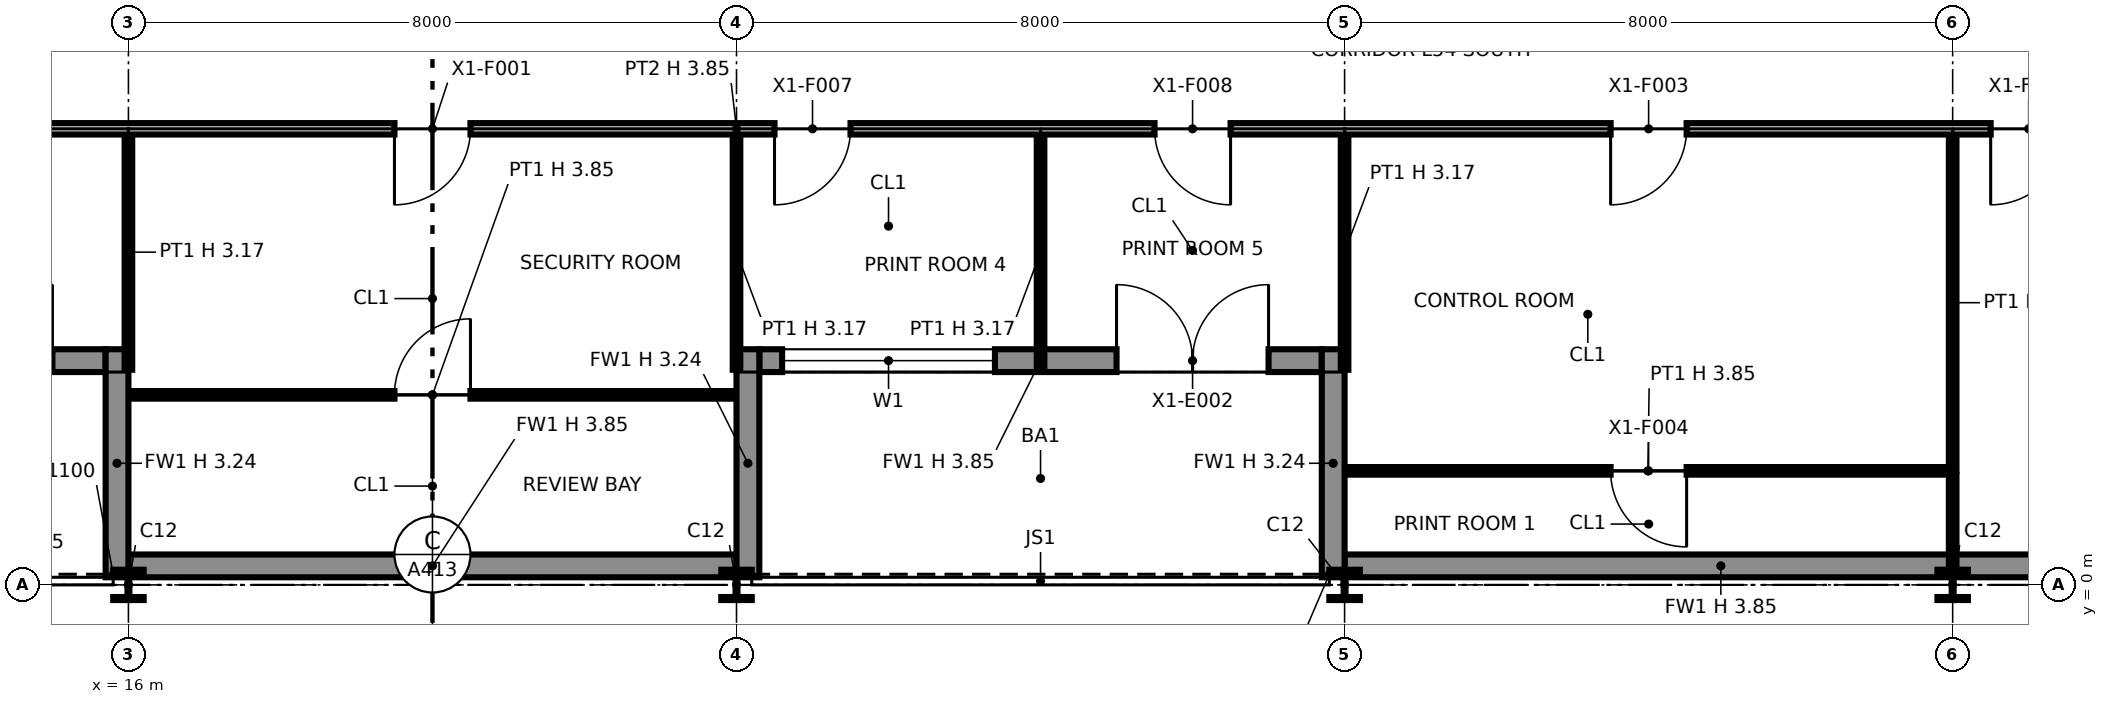
"""IFC4 building model, lengths in metres.
Left out: names, types, materials, properties, quantities, classifications, styles, units other than length and angle.
Written with IfcOpenShell. Run it as: python <this file> out.ifc"""

import sys

from ifc_helpers import new_model, si_unit, direction, frame, frame_2d, origin, origin_2d, place, context, subcontext, project, spatial, rectangle, i_section, extrude, element, fill, save


model = new_model("IFC4")
c1 = context("Model", 3, precision=1e-05, world=origin(), true_north=direction((0.0, 1.0)))
c2 = subcontext(c1, "Body", "Model", "MODEL_VIEW")
j1 = project(units=[si_unit("LENGTHUNIT", "METRE"), si_unit("PLANEANGLEUNIT", "RADIAN")], contexts=[c1])
p1 = place(None, origin())
s1 = spatial("IfcSite", under=j1, at=p1, CompositionType="ELEMENT")
p2 = place(p1, origin())
s2 = spatial("IfcBuilding", under=s1, at=p2, CompositionType="ELEMENT")
p3 = place(p2, frame((0.0, 0.0, 251.0)))
s3 = spatial("IfcBuildingStorey", under=s2, at=p3, CompositionType="ELEMENT", Elevation=251.0)
for number, where, z_axis, x_axis in (
    (1, (16.0, 0.0, 0.0), (0.0, 0.0, 1.0), (1.0, 0.0, 0.0)),
    (2, (24.0, 0.0, 0.0), (0.0, 0.0, 1.0), (1.0, 0.0, 0.0)),
    (3, (32.0, 0.0, 0.0), (0.0, 0.0, 1.0), (1.0, 0.0, 0.0)),
    (4, (40.0, 0.0, 0.0), (0.0, 0.0, 1.0), (1.0, 0.0, 0.0)),
):
    element("IfcColumn", number, at=place(p3, frame(where, z_axis=z_axis, x_axis=x_axis)), inside=s3, PredefinedType="COLUMN", context=c2, shape_type="SweptSolid", body=[
        extrude(i_section(OverallWidth=0.401, OverallDepth=0.399, WebThickness=0.025, FlangeThickness=0.04, at=origin_2d()), origin(), (0.0, 0.0, 1.0), 3.85),
    ])
p4 = place(p3, frame((8.3, 2.95, 0.0), z_axis=(0.0, 0.0, 1.0), x_axis=(1.0, 0.0, 0.0)))
e5 = element("IfcWall", 5, at=p4, inside=s3, PredefinedType="SOLIDWALL", context=c2, shape_type="SweptSolid", body=[
    extrude(rectangle(XDim=7.4, YDim=0.3, at=frame_2d((3.7, 0.0))), origin(), (0.0, 0.0, 1.0), 3.85),
])
p5 = place(p4, frame((0.3, 0.0, 0.9)))
e6 = element("IfcOpeningElement", 6, at=p5, cuts=e5, PredefinedType="OPENING", context=c2, shape_type="SweptSolid", body=[
    extrude(rectangle(XDim=2.8, YDim=2.2, at=frame_2d((1.4, 1.1))), frame((0.0, 0.16, 0.0), z_axis=(0.0, -1.0, 0.0), x_axis=(1.0, 0.0, 0.0)), (0.0, 0.0, 1.0), 0.32),
])
p6 = place(p4, frame((4.7, 0.0, 0.0)))
e7 = element("IfcOpeningElement", 7, at=p6, cuts=e5, PredefinedType="OPENING", context=c2, shape_type="SweptSolid", body=[
    extrude(rectangle(XDim=2.0, YDim=2.4, at=frame_2d((1.0, 1.2))), frame((0.0, 0.16, 0.0), z_axis=(0.0, -1.0, 0.0), x_axis=(1.0, 0.0, 0.0)), (0.0, 0.0, 1.0), 0.32),
])
p7 = place(p3, frame((15.85, 0.1, 0.0), z_axis=(0.0, 0.0, 1.0), x_axis=(0.0, 1.0, 0.0)))
e8 = element("IfcWall", 8, at=p7, inside=s3, PredefinedType="SOLIDWALL", context=c2, shape_type="SweptSolid", body=[
    extrude(rectangle(XDim=3.0, YDim=0.3, at=frame_2d((1.5, 0.0))), origin(), (0.0, 0.0, 1.0), 3.237),
])
p8 = place(p3, frame((16.0, 0.25, 0.0), z_axis=(0.0, 0.0, 1.0), x_axis=(1.0, 0.0, 0.0)))
e9 = element("IfcWall", 9, at=p8, inside=s3, PredefinedType="SOLIDWALL", context=c2, shape_type="SweptSolid", body=[
    extrude(rectangle(XDim=8.0, YDim=0.3, at=frame_2d((4.0, 0.0))), origin(), (0.0, 0.0, 1.0), 3.85),
])
p9 = place(p3, frame((24.3, 2.95, 0.0), z_axis=(0.0, 0.0, 1.0), x_axis=(1.0, 0.0, 0.0)))
e10 = element("IfcWall", 10, at=p9, inside=s3, PredefinedType="SOLIDWALL", context=c2, shape_type="SweptSolid", body=[
    extrude(rectangle(XDim=7.4, YDim=0.3, at=frame_2d((3.7, 0.0))), origin(), (0.0, 0.0, 1.0), 3.85),
])
p10 = place(p9, frame((0.3, 0.0, 0.9)))
e11 = element("IfcOpeningElement", 11, at=p10, cuts=e10, PredefinedType="OPENING", context=c2, shape_type="SweptSolid", body=[
    extrude(rectangle(XDim=2.8, YDim=2.2, at=frame_2d((1.4, 1.1))), frame((0.0, 0.16, 0.0), z_axis=(0.0, -1.0, 0.0), x_axis=(1.0, 0.0, 0.0)), (0.0, 0.0, 1.0), 0.32),
])
p11 = place(p9, frame((4.7, 0.0, 0.0)))
e12 = element("IfcOpeningElement", 12, at=p11, cuts=e10, PredefinedType="OPENING", context=c2, shape_type="SweptSolid", body=[
    extrude(rectangle(XDim=2.0, YDim=2.4, at=frame_2d((1.0, 1.2))), frame((0.0, 0.16, 0.0), z_axis=(0.0, -1.0, 0.0), x_axis=(1.0, 0.0, 0.0)), (0.0, 0.0, 1.0), 0.32),
])
for number, where, z_axis, x_axis in (
    (13, (24.15, 0.1, 0.0), (0.0, 0.0, 1.0), (0.0, 1.0, 0.0)),
    (14, (31.85, 0.1, 0.0), (0.0, 0.0, 1.0), (0.0, 1.0, 0.0)),
):
    element("IfcWall", number, at=place(p3, frame(where, z_axis=z_axis, x_axis=x_axis)), inside=s3, PredefinedType="SOLIDWALL", context=c2, shape_type="SweptSolid", body=[
        extrude(rectangle(XDim=3.0, YDim=0.3, at=frame_2d((1.5, 0.0))), origin(), (0.0, 0.0, 1.0), 3.237),
    ])
p12 = place(p3, frame((32.0, 0.25, 0.0), z_axis=(0.0, 0.0, 1.0), x_axis=(1.0, 0.0, 0.0)))
e15 = element("IfcWall", 15, at=p12, inside=s3, PredefinedType="SOLIDWALL", context=c2, shape_type="SweptSolid", body=[
    extrude(rectangle(XDim=9.9, YDim=0.3, at=frame_2d((4.95, 0.0))), origin(), (0.0, 0.0, 1.0), 3.85),
])
p13 = place(p3, frame((40.0, 0.13, 0.0), z_axis=(0.0, 0.0, 1.0), x_axis=(0.0, 1.0, 0.0)))
e16 = element("IfcWall", 16, at=p13, inside=s3, PredefinedType="PARTITIONING", context=c2, shape_type="SweptSolid", body=[
    extrude(rectangle(XDim=1.32, YDim=0.1, at=frame_2d((0.66, 0.0))), origin(), (0.0, 0.0, 1.0), 3.172),
])
p14 = place(p3, frame((32.03, 1.5, 0.0), z_axis=(0.0, 0.0, 1.0), x_axis=(1.0, 0.0, 0.0)))
e17 = element("IfcWall", 17, at=p14, inside=s3, PredefinedType="PARTITIONING", context=c2, shape_type="SweptSolid", body=[
    extrude(rectangle(XDim=7.92, YDim=0.1, at=frame_2d((3.96, 0.0))), origin(), (0.0, 0.0, 1.0), 3.85),
])
p15 = place(p14, frame((4.47, 0.0, 0.0), z_axis=(0.0, 0.0, 1.0), x_axis=(-1.0, 0.0, 0.0)))
e18 = element("IfcOpeningElement", 18, at=p15, cuts=e17, PredefinedType="OPENING", context=c2, shape_type="SweptSolid", body=[
    extrude(rectangle(XDim=1.0, YDim=2.1, at=frame_2d((0.5, 1.05))), frame((0.0, 0.06, 0.0), z_axis=(0.0, -1.0, 0.0), x_axis=(1.0, 0.0, 0.0)), (0.0, 0.0, 1.0), 0.12),
])
p16 = place(p3, frame((40.0, 1.5, 0.0), z_axis=(0.0, 0.0, 1.0), x_axis=(0.0, 1.0, 0.0)))
e19 = element("IfcWall", 19, at=p16, inside=s3, PredefinedType="PARTITIONING", context=c2, shape_type="SweptSolid", body=[
    extrude(rectangle(XDim=4.425, YDim=0.1, at=frame_2d((2.212, 0.0))), origin(), (0.0, 0.0, 1.0), 3.172),
])
p17 = place(p3, frame((16.03, 2.5, 0.0), z_axis=(0.0, 0.0, 1.0), x_axis=(1.0, 0.0, 0.0)))
e20 = element("IfcWall", 20, at=p17, inside=s3, PredefinedType="PARTITIONING", context=c2, shape_type="SweptSolid", body=[
    extrude(rectangle(XDim=7.94, YDim=0.1, at=frame_2d((3.97, 0.0))), origin(), (0.0, 0.0, 1.0), 3.85),
])
p18 = place(p17, frame((3.47, 0.0, 0.0)))
e21 = element("IfcOpeningElement", 21, at=p18, cuts=e20, PredefinedType="OPENING", context=c2, shape_type="SweptSolid", body=[
    extrude(rectangle(XDim=1.0, YDim=2.1, at=frame_2d((0.5, 1.05))), frame((0.0, 0.06, 0.0), z_axis=(0.0, -1.0, 0.0), x_axis=(1.0, 0.0, 0.0)), (0.0, 0.0, 1.0), 0.12),
])
for number, where, z_axis, x_axis in (
    (22, (16.0, 2.83, 0.0), (0.0, 0.0, 1.0), (0.0, 1.0, 0.0)),
    (23, (24.0, 2.83, 0.0), (0.0, 0.0, 1.0), (0.0, 1.0, 0.0)),
    (24, (28.0, 2.83, 0.0), (0.0, 0.0, 1.0), (0.0, 1.0, 0.0)),
    (25, (32.0, 2.83, 0.0), (0.0, 0.0, 1.0), (0.0, 1.0, 0.0)),
):
    element("IfcWall", number, at=place(p3, frame(where, z_axis=z_axis, x_axis=x_axis)), inside=s3, PredefinedType="PARTITIONING", context=c2, shape_type="SweptSolid", body=[
        extrude(rectangle(XDim=3.095, YDim=0.1, at=frame_2d((1.547, 0.0))), origin(), (0.0, 0.0, 1.0), 3.172),
    ])
p19 = place(p3, frame((6.075, 6.0, 0.0), z_axis=(0.0, 0.0, 1.0), x_axis=(1.0, 0.0, 0.0)))
e26 = element("IfcWall", 26, at=p19, inside=s3, PredefinedType="PARTITIONING", context=c2, shape_type="SweptSolid", body=[
    extrude(rectangle(XDim=35.85, YDim=0.15, at=frame_2d((17.925, 0.0))), origin(), (0.0, 0.0, 1.0), 3.85),
])
p20 = place(p19, frame((14.425, 0.0, 0.0), z_axis=(0.0, 0.0, 1.0), x_axis=(-1.0, 0.0, 0.0)))
e27 = element("IfcOpeningElement", 27, at=p20, cuts=e26, PredefinedType="OPENING", context=c2, shape_type="SweptSolid", body=[
    extrude(rectangle(XDim=1.0, YDim=2.1, at=frame_2d((0.5, 1.05))), frame((0.0, 0.085, 0.0), z_axis=(0.0, -1.0, 0.0), x_axis=(1.0, 0.0, 0.0)), (0.0, 0.0, 1.0), 0.17),
])
p21 = place(p19, frame((30.425, 0.0, 0.0), z_axis=(0.0, 0.0, 1.0), x_axis=(-1.0, 0.0, 0.0)))
e28 = element("IfcOpeningElement", 28, at=p21, cuts=e26, PredefinedType="OPENING", context=c2, shape_type="SweptSolid", body=[
    extrude(rectangle(XDim=1.0, YDim=2.1, at=frame_2d((0.5, 1.05))), frame((0.0, 0.085, 0.0), z_axis=(0.0, -1.0, 0.0), x_axis=(1.0, 0.0, 0.0)), (0.0, 0.0, 1.0), 0.17),
])
p22 = place(p19, frame((4.425, 0.0, 0.0), z_axis=(0.0, 0.0, 1.0), x_axis=(-1.0, 0.0, 0.0)))
e29 = element("IfcOpeningElement", 29, at=p22, cuts=e26, PredefinedType="OPENING", context=c2, shape_type="SweptSolid", body=[
    extrude(rectangle(XDim=1.0, YDim=2.1, at=frame_2d((0.5, 1.05))), frame((0.0, 0.085, 0.0), z_axis=(0.0, -1.0, 0.0), x_axis=(1.0, 0.0, 0.0)), (0.0, 0.0, 1.0), 0.17),
])
p23 = place(p19, frame((8.425, 0.0, 0.0), z_axis=(0.0, 0.0, 1.0), x_axis=(-1.0, 0.0, 0.0)))
e30 = element("IfcOpeningElement", 30, at=p23, cuts=e26, PredefinedType="OPENING", context=c2, shape_type="SweptSolid", body=[
    extrude(rectangle(XDim=1.0, YDim=2.1, at=frame_2d((0.5, 1.05))), frame((0.0, 0.085, 0.0), z_axis=(0.0, -1.0, 0.0), x_axis=(1.0, 0.0, 0.0)), (0.0, 0.0, 1.0), 0.17),
])
p24 = place(p19, frame((19.425, 0.0, 0.0), z_axis=(0.0, 0.0, 1.0), x_axis=(-1.0, 0.0, 0.0)))
e31 = element("IfcOpeningElement", 31, at=p24, cuts=e26, PredefinedType="OPENING", context=c2, shape_type="SweptSolid", body=[
    extrude(rectangle(XDim=1.0, YDim=2.1, at=frame_2d((0.5, 1.05))), frame((0.0, 0.085, 0.0), z_axis=(0.0, -1.0, 0.0), x_axis=(1.0, 0.0, 0.0)), (0.0, 0.0, 1.0), 0.17),
])
p25 = place(p19, frame((24.425, 0.0, 0.0), z_axis=(0.0, 0.0, 1.0), x_axis=(-1.0, 0.0, 0.0)))
e32 = element("IfcOpeningElement", 32, at=p25, cuts=e26, PredefinedType="OPENING", context=c2, shape_type="SweptSolid", body=[
    extrude(rectangle(XDim=1.0, YDim=2.1, at=frame_2d((0.5, 1.05))), frame((0.0, 0.085, 0.0), z_axis=(0.0, -1.0, 0.0), x_axis=(1.0, 0.0, 0.0)), (0.0, 0.0, 1.0), 0.17),
])
p26 = place(p19, frame((35.425, 0.0, 0.0), z_axis=(0.0, 0.0, 1.0), x_axis=(-1.0, 0.0, 0.0)))
e33 = element("IfcOpeningElement", 33, at=p26, cuts=e26, PredefinedType="OPENING", context=c2, shape_type="SweptSolid", body=[
    extrude(rectangle(XDim=1.0, YDim=2.1, at=frame_2d((0.5, 1.05))), frame((0.0, 0.085, 0.0), z_axis=(0.0, -1.0, 0.0), x_axis=(1.0, 0.0, 0.0)), (0.0, 0.0, 1.0), 0.17),
])
p27 = place(p10, origin())
e34 = element("IfcWindow", 34, at=p27, inside=s3, PartitioningType="SINGLE_PANEL", PredefinedType="WINDOW", context=c2, shape_type="SweptSolid", body=[
    extrude(rectangle(XDim=2.8, YDim=2.2, at=frame_2d((1.4, 1.1))), frame((0.0, 0.03, 0.0), z_axis=(0.0, -1.0, 0.0), x_axis=(1.0, 0.0, 0.0)), (0.0, 0.0, 1.0), 0.06),
])
fill(e11, e34)
p28 = place(p11, origin())
e35 = element("IfcDoor", 35, at=p28, inside=s3, OperationType="DOUBLE_DOOR_SINGLE_SWING", PredefinedType="DOOR", context=c2, shape_type="SweptSolid", body=[
    extrude(rectangle(XDim=2.0, YDim=2.4, at=frame_2d((1.0, 1.2))), frame((0.0, 0.025, 0.0), z_axis=(0.0, -1.0, 0.0), x_axis=(1.0, 0.0, 0.0)), (0.0, 0.0, 1.0), 0.05),
])
fill(e12, e35)
p29 = place(p20, origin())
e36 = element("IfcDoor", 36, at=p29, inside=s3, OperationType="SINGLE_SWING_RIGHT", PredefinedType="DOOR", context=c2, shape_type="SweptSolid", body=[
    extrude(rectangle(XDim=1.0, YDim=2.1, at=frame_2d((0.5, 1.05))), frame((0.0, 0.025, 0.0), z_axis=(0.0, -1.0, 0.0), x_axis=(1.0, 0.0, 0.0)), (0.0, 0.0, 1.0), 0.05),
])
fill(e27, e36)
p30 = place(p18, origin())
e37 = element("IfcDoor", 37, at=p30, inside=s3, OperationType="SINGLE_SWING_RIGHT", PredefinedType="DOOR", context=c2, shape_type="SweptSolid", body=[
    extrude(rectangle(XDim=1.0, YDim=2.1, at=frame_2d((0.5, 1.05))), frame((0.0, 0.025, 0.0), z_axis=(0.0, -1.0, 0.0), x_axis=(1.0, 0.0, 0.0)), (0.0, 0.0, 1.0), 0.05),
])
fill(e21, e37)
p31 = place(p21, origin())
e38 = element("IfcDoor", 38, at=p31, inside=s3, OperationType="SINGLE_SWING_RIGHT", PredefinedType="DOOR", context=c2, shape_type="SweptSolid", body=[
    extrude(rectangle(XDim=1.0, YDim=2.1, at=frame_2d((0.5, 1.05))), frame((0.0, 0.025, 0.0), z_axis=(0.0, -1.0, 0.0), x_axis=(1.0, 0.0, 0.0)), (0.0, 0.0, 1.0), 0.05),
])
fill(e28, e38)
p32 = place(p15, origin())
e39 = element("IfcDoor", 39, at=p32, inside=s3, OperationType="SINGLE_SWING_LEFT", PredefinedType="DOOR", context=c2, shape_type="SweptSolid", body=[
    extrude(rectangle(XDim=1.0, YDim=2.1, at=frame_2d((0.5, 1.05))), frame((0.0, 0.025, 0.0), z_axis=(0.0, -1.0, 0.0), x_axis=(1.0, 0.0, 0.0)), (0.0, 0.0, 1.0), 0.05),
])
fill(e18, e39)
p33 = place(p24, origin())
e40 = element("IfcDoor", 40, at=p33, inside=s3, OperationType="SINGLE_SWING_RIGHT", PredefinedType="DOOR", context=c2, shape_type="SweptSolid", body=[
    extrude(rectangle(XDim=1.0, YDim=2.1, at=frame_2d((0.5, 1.05))), frame((0.0, 0.025, 0.0), z_axis=(0.0, -1.0, 0.0), x_axis=(1.0, 0.0, 0.0)), (0.0, 0.0, 1.0), 0.05),
])
fill(e31, e40)
p34 = place(p25, origin())
e41 = element("IfcDoor", 41, at=p34, inside=s3, OperationType="SINGLE_SWING_LEFT", PredefinedType="DOOR", context=c2, shape_type="SweptSolid", body=[
    extrude(rectangle(XDim=1.0, YDim=2.1, at=frame_2d((0.5, 1.05))), frame((0.0, 0.025, 0.0), z_axis=(0.0, -1.0, 0.0), x_axis=(1.0, 0.0, 0.0)), (0.0, 0.0, 1.0), 0.05),
])
fill(e32, e41)
p35 = place(p26, origin())
e42 = element("IfcDoor", 42, at=p35, inside=s3, OperationType="SINGLE_SWING_RIGHT", PredefinedType="DOOR", context=c2, shape_type="SweptSolid", body=[
    extrude(rectangle(XDim=1.0, YDim=2.1, at=frame_2d((0.5, 1.05))), frame((0.0, 0.025, 0.0), z_axis=(0.0, -1.0, 0.0), x_axis=(1.0, 0.0, 0.0)), (0.0, 0.0, 1.0), 0.05),
])
fill(e33, e42)
save(model, sys.argv[1])
